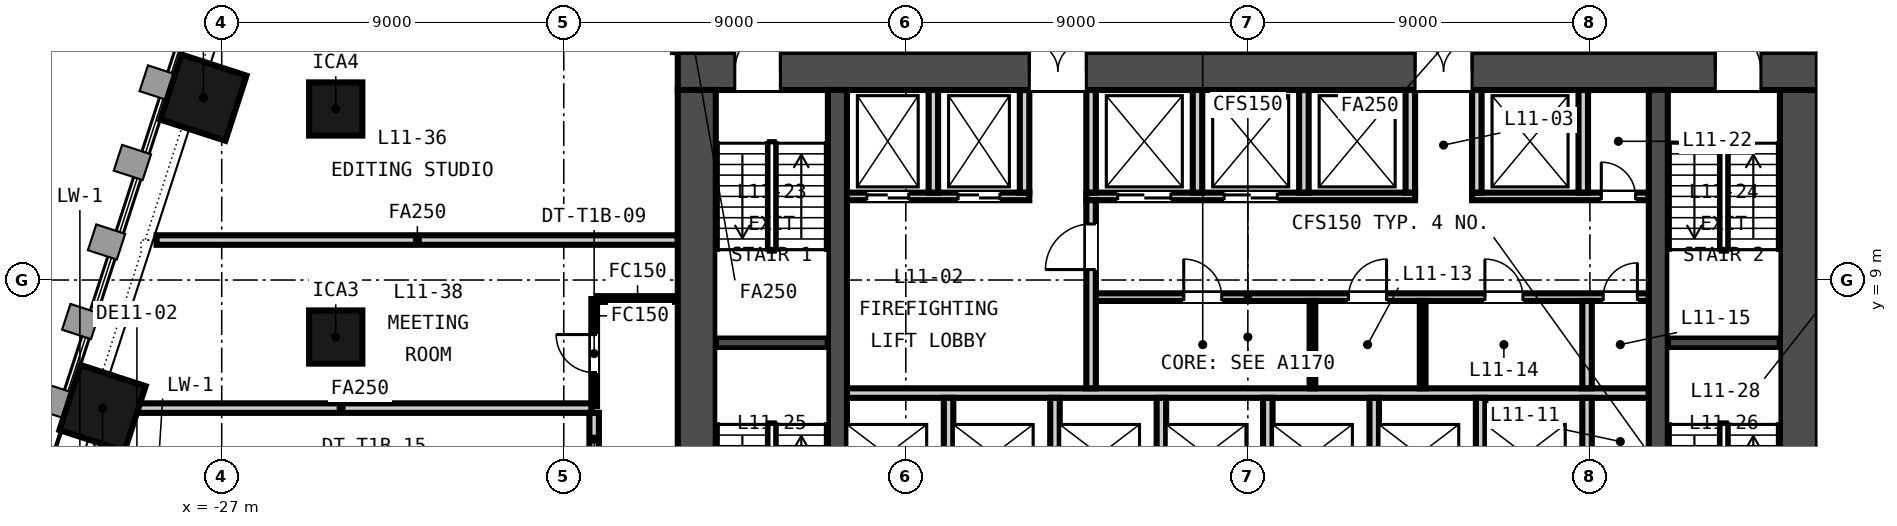
"""IFC4 building model, lengths in metres.
Left out: names, types, materials, properties, quantities, classifications, styles, units other than length and angle.
Written with IfcOpenShell. Run it as: python <this file> out.ifc"""

import sys

from ifc_helpers import new_model, si_unit, direction, frame, frame_2d, origin, origin_2d, place, context, subcontext, project, spatial, rectangle, extrude, element, fill, save


model = new_model("IFC4")
c1 = context("Model", 3, precision=1e-05, world=origin(), true_north=direction((0.0, 1.0)))
c2 = subcontext(c1, "Body", "Model", "MODEL_VIEW")
j1 = project(units=[si_unit("LENGTHUNIT", "METRE"), si_unit("PLANEANGLEUNIT", "RADIAN")], contexts=[c1])
p1 = place(None, origin())
s1 = spatial("IfcSite", under=j1, at=p1, CompositionType="ELEMENT")
p2 = place(p1, origin())
s2 = spatial("IfcBuilding", under=s1, at=p2, CompositionType="ELEMENT")
p3 = place(p2, frame((0.0, 0.0, 54.25)))
s3 = spatial("IfcBuildingStorey", under=s2, at=p3, CompositionType="ELEMENT", Elevation=54.25)
p4 = place(p3, frame((-15.0, 14.5, -0.15), z_axis=(0.0, 0.0, 1.0), x_axis=(1.0, 0.0, 0.0)))
e1 = element("IfcWall", 1, at=p4, inside=s3, PredefinedType="SOLIDWALL", context=c2, shape_type="SweptSolid", body=[
    extrude(rectangle(XDim=30.0, YDim=1.0, at=frame_2d((15.0, 0.0))), origin(), (0.0, 0.0, 1.0), 3.65),
])
p5 = place(p4, frame((9.25, 0.0, 0.15)))
e2 = element("IfcOpeningElement", 2, at=p5, cuts=e1, PredefinedType="OPENING", context=c2, shape_type="SweptSolid", body=[
    extrude(rectangle(XDim=1.5, YDim=2.1, at=frame_2d((0.75, 1.05))), frame((0.0, 0.51, 0.0), z_axis=(0.0, -1.0, 0.0), x_axis=(1.0, 0.0, 0.0)), (0.0, 0.0, 1.0), 1.02),
])
p6 = place(p4, frame((19.4, 0.0, 0.15)))
e3 = element("IfcOpeningElement", 3, at=p6, cuts=e1, PredefinedType="OPENING", context=c2, shape_type="SweptSolid", body=[
    extrude(rectangle(XDim=1.5, YDim=2.1, at=frame_2d((0.75, 1.05))), frame((0.0, 0.51, 0.0), z_axis=(0.0, -1.0, 0.0), x_axis=(1.0, 0.0, 0.0)), (0.0, 0.0, 1.0), 1.02),
])
p7 = place(p4, frame((1.5, 0.0, 0.15)))
e4 = element("IfcOpeningElement", 4, at=p7, cuts=e1, PredefinedType="OPENING", context=c2, shape_type="SweptSolid", body=[
    extrude(rectangle(XDim=1.2, YDim=2.1, at=frame_2d((0.6, 1.05))), frame((0.0, 0.51, 0.0), z_axis=(0.0, -1.0, 0.0), x_axis=(1.0, 0.0, 0.0)), (0.0, 0.0, 1.0), 1.02),
])
p8 = place(p4, frame((27.3, 0.0, 0.15)))
e5 = element("IfcOpeningElement", 5, at=p8, cuts=e1, PredefinedType="OPENING", context=c2, shape_type="SweptSolid", body=[
    extrude(rectangle(XDim=1.2, YDim=2.1, at=frame_2d((0.6, 1.05))), frame((0.0, 0.51, 0.0), z_axis=(0.0, -1.0, 0.0), x_axis=(1.0, 0.0, 0.0)), (0.0, 0.0, 1.0), 1.02),
])
for number, where, z_axis, x_axis in (
    (6, (-14.5, 1.0, -0.15), (0.0, 0.0, 1.0), (0.0, 1.0, 0.0)),
    (7, (14.5, 1.0, -0.15), (0.0, 0.0, 1.0), (0.0, 1.0, 0.0)),
):
    element("IfcWall", number, at=place(p3, frame(where, z_axis=z_axis, x_axis=x_axis)), inside=s3, PredefinedType="SOLIDWALL", context=c2, shape_type="SweptSolid", body=[
        extrude(rectangle(XDim=13.0, YDim=1.0, at=frame_2d((6.5, 0.0))), origin(), (0.0, 0.0, 1.0), 3.65),
    ])
for number, where, z_axis, x_axis in (
    (8, (-10.8, 1.0, -0.15), (0.0, 0.0, 1.0), (0.0, 1.0, 0.0)),
    (9, (10.8, 1.0, -0.15), (0.0, 0.0, 1.0), (0.0, 1.0, 0.0)),
):
    element("IfcWall", number, at=place(p3, frame(where, z_axis=z_axis, x_axis=x_axis)), inside=s3, PredefinedType="SOLIDWALL", context=c2, shape_type="SweptSolid", body=[
        extrude(rectangle(XDim=13.0, YDim=0.5, at=frame_2d((6.5, 0.0))), origin(), (0.0, 0.0, 1.0), 3.65),
    ])
for number, where, z_axis, x_axis in (
    (10, (-27.482, 13.799, -0.15), (0.0, 0.0, 1.0), (-0.309, -0.951, 0.0)),
    (11, (-30.136, 5.63, -0.15), (0.0, 0.0, 1.0), (-0.309, -0.951, 0.0)),
):
    element("IfcColumn", number, at=place(p3, frame(where, z_axis=z_axis, x_axis=x_axis)), inside=s3, PredefinedType="COLUMN", context=c2, shape_type="SweptSolid", body=[
        extrude(rectangle(XDim=1.8, YDim=1.8, at=origin_2d()), origin(), (0.0, 0.0, 1.0), 3.65),
    ])
for number, where, z_axis, x_axis in (
    (12, (-24.0, 7.5, -0.15), (0.0, 0.0, 1.0), (1.0, 0.0, 0.0)),
    (13, (-24.0, 13.5, -0.15), (0.0, 0.0, 1.0), (1.0, 0.0, 0.0)),
):
    element("IfcColumn", number, at=place(p3, frame(where, z_axis=z_axis, x_axis=x_axis)), inside=s3, PredefinedType="COLUMN", context=c2, shape_type="SweptSolid", body=[
        extrude(rectangle(XDim=1.4, YDim=1.4, at=origin_2d()), origin(), (0.0, 0.0, 1.0), 3.65),
    ])
p9 = place(p3, frame((-10.55, 6.025, 0.0), z_axis=(0.0, 0.0, 1.0), x_axis=(1.0, 0.0, 0.0)))
e14 = element("IfcWall", 14, at=p9, inside=s3, PredefinedType="PARTITIONING", context=c2, shape_type="SweptSolid", body=[
    extrude(rectangle(XDim=21.1, YDim=0.25, at=frame_2d((10.55, 0.0))), origin(), (0.0, 0.0, 1.0), 3.5),
])
p10 = place(p3, frame((-4.125, 8.55, 0.0), z_axis=(0.0, 0.0, 1.0), x_axis=(1.0, 0.0, 0.0)))
e15 = element("IfcWall", 15, at=p10, inside=s3, PredefinedType="PARTITIONING", context=c2, shape_type="SweptSolid", body=[
    extrude(rectangle(XDim=14.675, YDim=0.2, at=frame_2d((7.337, 0.0))), origin(), (0.0, 0.0, 1.0), 3.5),
])
p11 = place(p10, frame((2.438, 0.0, 0.0)))
e16 = element("IfcOpeningElement", 16, at=p11, cuts=e15, PredefinedType="OPENING", context=c2, shape_type="SweptSolid", body=[
    extrude(rectangle(XDim=1.0, YDim=2.1, at=frame_2d((0.5, 1.05))), frame((0.0, 0.11, 0.0), z_axis=(0.0, -1.0, 0.0), x_axis=(1.0, 0.0, 0.0)), (0.0, 0.0, 1.0), 0.22),
])
p12 = place(p10, frame((6.775, 0.0, 0.0)))
e17 = element("IfcOpeningElement", 17, at=p12, cuts=e15, PredefinedType="OPENING", context=c2, shape_type="SweptSolid", body=[
    extrude(rectangle(XDim=1.0, YDim=2.1, at=frame_2d((0.5, 1.05))), frame((0.0, 0.11, 0.0), z_axis=(0.0, -1.0, 0.0), x_axis=(1.0, 0.0, 0.0)), (0.0, 0.0, 1.0), 0.22),
])
p13 = place(p10, frame((10.363, 0.0, 0.0)))
e18 = element("IfcOpeningElement", 18, at=p13, cuts=e15, PredefinedType="OPENING", context=c2, shape_type="SweptSolid", body=[
    extrude(rectangle(XDim=1.0, YDim=2.1, at=frame_2d((0.5, 1.05))), frame((0.0, 0.11, 0.0), z_axis=(0.0, -1.0, 0.0), x_axis=(1.0, 0.0, 0.0)), (0.0, 0.0, 1.0), 0.22),
])
p14 = place(p10, frame((13.475, 0.0, 0.0)))
e19 = element("IfcOpeningElement", 19, at=p14, cuts=e15, PredefinedType="OPENING", context=c2, shape_type="SweptSolid", body=[
    extrude(rectangle(XDim=0.9, YDim=2.1, at=frame_2d((0.45, 1.05))), frame((0.0, 0.11, 0.0), z_axis=(0.0, -1.0, 0.0), x_axis=(1.0, 0.0, 0.0)), (0.0, 0.0, 1.0), 0.22),
])
p15 = place(p3, frame((-10.55, 11.2, 0.0), z_axis=(0.0, 0.0, 1.0), x_axis=(1.0, 0.0, 0.0)))
e20 = element("IfcWall", 20, at=p15, inside=s3, PredefinedType="PARTITIONING", context=c2, shape_type="SweptSolid", body=[
    extrude(rectangle(XDim=4.8, YDim=0.2, at=frame_2d((2.4, 0.0))), origin(), (0.0, 0.0, 1.0), 3.5),
])
p16 = place(p15, frame((0.525, 0.0, 0.0)))
e21 = element("IfcOpeningElement", 21, at=p16, cuts=e20, PredefinedType="OPENING", context=c2, shape_type="SweptSolid", body=[
    extrude(rectangle(XDim=1.1, YDim=2.1, at=frame_2d((0.55, 1.05))), frame((0.0, 0.11, 0.0), z_axis=(0.0, -1.0, 0.0), x_axis=(1.0, 0.0, 0.0)), (0.0, 0.0, 1.0), 0.22),
])
p17 = place(p15, frame((2.925, 0.0, 0.0)))
e22 = element("IfcOpeningElement", 22, at=p17, cuts=e20, PredefinedType="OPENING", context=c2, shape_type="SweptSolid", body=[
    extrude(rectangle(XDim=1.1, YDim=2.1, at=frame_2d((0.55, 1.05))), frame((0.0, 0.11, 0.0), z_axis=(0.0, -1.0, 0.0), x_axis=(1.0, 0.0, 0.0)), (0.0, 0.0, 1.0), 0.22),
])
p18 = place(p3, frame((-4.25, 11.2, 0.0), z_axis=(0.0, 0.0, 1.0), x_axis=(1.0, 0.0, 0.0)))
e23 = element("IfcWall", 23, at=p18, inside=s3, PredefinedType="PARTITIONING", context=c2, shape_type="SweptSolid", body=[
    extrude(rectangle(XDim=8.65, YDim=0.2, at=frame_2d((4.325, 0.0))), origin(), (0.0, 0.0, 1.0), 3.5),
])
p19 = place(p18, frame((0.825, 0.0, 0.0)))
e24 = element("IfcOpeningElement", 24, at=p19, cuts=e23, PredefinedType="OPENING", context=c2, shape_type="SweptSolid", body=[
    extrude(rectangle(XDim=1.4, YDim=2.1, at=frame_2d((0.7, 1.05))), frame((0.0, 0.11, 0.0), z_axis=(0.0, -1.0, 0.0), x_axis=(1.0, 0.0, 0.0)), (0.0, 0.0, 1.0), 0.22),
])
p20 = place(p18, frame((3.625, 0.0, 0.0)))
e25 = element("IfcOpeningElement", 25, at=p20, cuts=e23, PredefinedType="OPENING", context=c2, shape_type="SweptSolid", body=[
    extrude(rectangle(XDim=1.4, YDim=2.1, at=frame_2d((0.7, 1.05))), frame((0.0, 0.11, 0.0), z_axis=(0.0, -1.0, 0.0), x_axis=(1.0, 0.0, 0.0)), (0.0, 0.0, 1.0), 0.22),
])
p21 = place(p3, frame((5.9, 11.2, 0.0), z_axis=(0.0, 0.0, 1.0), x_axis=(1.0, 0.0, 0.0)))
e26 = element("IfcWall", 26, at=p21, inside=s3, PredefinedType="PARTITIONING", context=c2, shape_type="SweptSolid", body=[
    extrude(rectangle(XDim=4.65, YDim=0.2, at=frame_2d((2.325, 0.0))), origin(), (0.0, 0.0, 1.0), 3.5),
])
p22 = place(p21, frame((3.4, 0.0, 0.0)))
e27 = element("IfcOpeningElement", 27, at=p22, cuts=e26, PredefinedType="OPENING", context=c2, shape_type="SweptSolid", body=[
    extrude(rectangle(XDim=0.9, YDim=2.1, at=frame_2d((0.45, 1.05))), frame((0.0, 0.11, 0.0), z_axis=(0.0, -1.0, 0.0), x_axis=(1.0, 0.0, 0.0)), (0.0, 0.0, 1.0), 0.22),
])
p23 = place(p3, frame((-4.125, 6.15, 0.0), z_axis=(0.0, 0.0, 1.0), x_axis=(0.0, 1.0, 0.0)))
e28 = element("IfcWall", 28, at=p23, inside=s3, PredefinedType="PARTITIONING", context=c2, shape_type="SweptSolid", body=[
    extrude(rectangle(XDim=4.95, YDim=0.25, at=frame_2d((2.475, 0.0))), origin(), (0.0, 0.0, 1.0), 3.5),
])
p24 = place(p23, frame((3.125, 0.0, 0.0)))
e29 = element("IfcOpeningElement", 29, at=p24, cuts=e28, PredefinedType="OPENING", context=c2, shape_type="SweptSolid", body=[
    extrude(rectangle(XDim=1.2, YDim=2.1, at=frame_2d((0.6, 1.05))), frame((0.0, 0.135, 0.0), z_axis=(0.0, -1.0, 0.0), x_axis=(1.0, 0.0, 0.0)), (0.0, 0.0, 1.0), 0.27),
])
for number, where, z_axis, x_axis in (
    (30, (-7.875, 3.6, 0.0), (0.0, 0.0, 1.0), (0.0, 1.0, 0.0)),
    (31, (-5.075, 3.6, 0.0), (0.0, 0.0, 1.0), (0.0, 1.0, 0.0)),
    (32, (-2.275, 3.6, 0.0), (0.0, 0.0, 1.0), (0.0, 1.0, 0.0)),
    (33, (0.525, 3.6, 0.0), (0.0, 0.0, 1.0), (0.0, 1.0, 0.0)),
    (34, (3.325, 3.6, 0.0), (0.0, 0.0, 1.0), (0.0, 1.0, 0.0)),
    (35, (6.125, 3.6, 0.0), (0.0, 0.0, 1.0), (0.0, 1.0, 0.0)),
    (36, (8.925, 3.6, 0.0), (0.0, 0.0, 1.0), (0.0, 1.0, 0.0)),
):
    element("IfcWall", number, at=place(p3, frame(where, z_axis=z_axis, x_axis=x_axis)), inside=s3, PredefinedType="PARTITIONING", context=c2, shape_type="SweptSolid", body=[
        extrude(rectangle(XDim=2.3, YDim=0.25, at=frame_2d((1.15, 0.0))), origin(), (0.0, 0.0, 1.0), 3.5),
    ])
for number, where, z_axis, x_axis in (
    (37, (1.7, 6.15, 0.0), (0.0, 0.0, 1.0), (0.0, 1.0, 0.0)),
    (38, (4.6, 6.15, 0.0), (0.0, 0.0, 1.0), (0.0, 1.0, 0.0)),
):
    element("IfcWall", number, at=place(p3, frame(where, z_axis=z_axis, x_axis=x_axis)), inside=s3, PredefinedType="PARTITIONING", context=c2, shape_type="SweptSolid", body=[
        extrude(rectangle(XDim=2.3, YDim=0.15, at=frame_2d((1.15, 0.0))), origin(), (0.0, 0.0, 1.0), 3.5),
    ])
p25 = place(p3, frame((8.925, 6.15, 0.0), z_axis=(0.0, 0.0, 1.0), x_axis=(0.0, 1.0, 0.0)))
e39 = element("IfcWall", 39, at=p25, inside=s3, PredefinedType="PARTITIONING", context=c2, shape_type="SweptSolid", body=[
    extrude(rectangle(XDim=2.3, YDim=0.25, at=frame_2d((1.15, 0.0))), origin(), (0.0, 0.0, 1.0), 3.5),
])
for number, where, z_axis, x_axis in (
    (40, (-8.275, 11.3, 0.0), (0.0, 0.0, 1.0), (0.0, 1.0, 0.0)),
    (41, (-5.875, 11.3, 0.0), (0.0, 0.0, 1.0), (0.0, 1.0, 0.0)),
    (42, (-4.125, 11.3, 0.0), (0.0, 0.0, 1.0), (0.0, 1.0, 0.0)),
    (43, (-1.325, 11.3, 0.0), (0.0, 0.0, 1.0), (0.0, 1.0, 0.0)),
    (44, (1.475, 11.3, 0.0), (0.0, 0.0, 1.0), (0.0, 1.0, 0.0)),
    (45, (4.275, 11.3, 0.0), (0.0, 0.0, 1.0), (0.0, 1.0, 0.0)),
    (46, (6.025, 11.3, 0.0), (0.0, 0.0, 1.0), (0.0, 1.0, 0.0)),
    (47, (8.825, 11.3, 0.0), (0.0, 0.0, 1.0), (0.0, 1.0, 0.0)),
):
    element("IfcWall", number, at=place(p3, frame(where, z_axis=z_axis, x_axis=x_axis)), inside=s3, PredefinedType="PARTITIONING", context=c2, shape_type="SweptSolid", body=[
        extrude(rectangle(XDim=2.7, YDim=0.25, at=frame_2d((1.35, 0.0))), origin(), (0.0, 0.0, 1.0), 3.5),
    ])
for number, where, z_axis, x_axis in (
    (48, (-14.0, 7.35, -0.15), (0.0, 0.0, 1.0), (1.0, 0.0, 0.0)),
    (49, (11.05, 7.35, -0.15), (0.0, 0.0, 1.0), (1.0, 0.0, 0.0)),
):
    element("IfcWall", number, at=place(p3, frame(where, z_axis=z_axis, x_axis=x_axis)), inside=s3, PredefinedType="SOLIDWALL", context=c2, shape_type="SweptSolid", body=[
        extrude(rectangle(XDim=2.95, YDim=0.3, at=frame_2d((1.475, 0.0))), origin(), (0.0, 0.0, 1.0), 3.65),
    ])
p26 = place(p3, frame((-15.002, 14.998, 0.0), z_axis=(0.0, 0.0, 1.0), x_axis=(0.000708152429, 0.99999974926, 0.0)))
e50 = element("IfcWall", 50, at=p26, inside=s3, PredefinedType="PARTITIONING", context=c2, shape_type="SweptSolid", body=[
    extrude(rectangle(XDim=2.758, YDim=0.25, at=frame_2d((1.379, 0.0))), origin(), (0.0, 0.0, 1.0), 2.741),
])
p27 = place(p26, frame((0.479, 0.0, 0.0)))
e51 = element("IfcOpeningElement", 51, at=p27, cuts=e50, PredefinedType="OPENING", context=c2, shape_type="SweptSolid", body=[
    extrude(rectangle(XDim=1.8, YDim=2.1, at=frame_2d((0.9, 1.05))), frame((0.0, 0.135, 0.0), z_axis=(0.0, -1.0, 0.0), x_axis=(1.0, 0.0, 0.0)), (0.0, 0.0, 1.0), 0.27),
])
p28 = place(p3, frame((-28.714, 10.052, 0.0), z_axis=(0.0, 0.0, 1.0), x_axis=(1.0, 0.0, 0.0)))
e52 = element("IfcWall", 52, at=p28, inside=s3, PredefinedType="PARTITIONING", context=c2, shape_type="SweptSolid", body=[
    extrude(rectangle(XDim=13.714, YDim=0.25, at=frame_2d((6.857, 0.0))), origin(), (0.0, 0.0, 1.0), 2.741),
])
p29 = place(p3, frame((-17.2, 5.68, 0.0), z_axis=(0.0, 0.0, 1.0), x_axis=(0.0, 1.0, 0.0)))
e53 = element("IfcWall", 53, at=p29, inside=s3, PredefinedType="PARTITIONING", context=c2, shape_type="SweptSolid", body=[
    extrude(rectangle(XDim=2.82, YDim=0.15, at=frame_2d((1.41, 0.0))), origin(), (0.0, 0.0, 1.0), 2.741),
])
p30 = place(p29, frame((0.885, 0.0, 0.0)))
e54 = element("IfcOpeningElement", 54, at=p30, cuts=e53, PredefinedType="OPENING", context=c2, shape_type="SweptSolid", body=[
    extrude(rectangle(XDim=1.0, YDim=2.1, at=frame_2d((0.5, 1.05))), frame((0.0, 0.085, 0.0), z_axis=(0.0, -1.0, 0.0), x_axis=(1.0, 0.0, 0.0)), (0.0, 0.0, 1.0), 0.17),
])
p31 = place(p3, frame((-17.125, 8.5, 0.0), z_axis=(0.0, 0.0, 1.0), x_axis=(1.0, 0.0, 0.0)))
e55 = element("IfcWall", 55, at=p31, inside=s3, PredefinedType="PARTITIONING", context=c2, shape_type="SweptSolid", body=[
    extrude(rectangle(XDim=2.125, YDim=0.15, at=frame_2d((1.062, 0.0))), origin(), (0.0, 0.0, 1.0), 2.741),
])
p32 = place(p3, frame((-30.451, 5.63, 0.0), z_axis=(0.0, 0.0, 1.0), x_axis=(1.0, 0.0, 0.0)))
e56 = element("IfcWall", 56, at=p32, inside=s3, PredefinedType="PARTITIONING", context=c2, shape_type="SweptSolid", body=[
    extrude(rectangle(XDim=13.176, YDim=0.25, at=frame_2d((6.588, 0.0))), origin(), (0.0, 0.0, 1.0), 2.741),
])
p33 = place(p3, frame((-17.2, 4.125, 0.0), z_axis=(0.0, 0.0, 1.0), x_axis=(0.0, 1.0, 0.0)))
e57 = element("IfcWall", 57, at=p33, inside=s3, PredefinedType="PARTITIONING", context=c2, shape_type="SweptSolid", body=[
    extrude(rectangle(XDim=1.38, YDim=0.25, at=frame_2d((0.69, 0.0))), origin(), (0.0, 0.0, 1.0), 2.741),
])
p34 = place(p24, origin())
e58 = element("IfcDoor", 58, at=p34, inside=s3, OperationType="SINGLE_SWING_LEFT", PredefinedType="DOOR", context=c2, shape_type="SweptSolid", body=[
    extrude(rectangle(XDim=1.2, YDim=2.1, at=frame_2d((0.6, 1.05))), frame((0.0, 0.025, 0.0), z_axis=(0.0, -1.0, 0.0), x_axis=(1.0, 0.0, 0.0)), (0.0, 0.0, 1.0), 0.05),
])
fill(e29, e58)
p35 = place(p11, origin())
e59 = element("IfcDoor", 59, at=p35, inside=s3, OperationType="SINGLE_SWING_LEFT", PredefinedType="DOOR", context=c2, shape_type="SweptSolid", body=[
    extrude(rectangle(XDim=1.0, YDim=2.1, at=frame_2d((0.5, 1.05))), frame((0.0, 0.025, 0.0), z_axis=(0.0, -1.0, 0.0), x_axis=(1.0, 0.0, 0.0)), (0.0, 0.0, 1.0), 0.05),
])
fill(e16, e59)
p36 = place(p12, origin())
e60 = element("IfcDoor", 60, at=p36, inside=s3, OperationType="SINGLE_SWING_RIGHT", PredefinedType="DOOR", context=c2, shape_type="SweptSolid", body=[
    extrude(rectangle(XDim=1.0, YDim=2.1, at=frame_2d((0.5, 1.05))), frame((0.0, 0.025, 0.0), z_axis=(0.0, -1.0, 0.0), x_axis=(1.0, 0.0, 0.0)), (0.0, 0.0, 1.0), 0.05),
])
fill(e17, e60)
p37 = place(p13, origin())
e61 = element("IfcDoor", 61, at=p37, inside=s3, OperationType="SINGLE_SWING_LEFT", PredefinedType="DOOR", context=c2, shape_type="SweptSolid", body=[
    extrude(rectangle(XDim=1.0, YDim=2.1, at=frame_2d((0.5, 1.05))), frame((0.0, 0.025, 0.0), z_axis=(0.0, -1.0, 0.0), x_axis=(1.0, 0.0, 0.0)), (0.0, 0.0, 1.0), 0.05),
])
fill(e18, e61)
p38 = place(p14, origin())
e62 = element("IfcDoor", 62, at=p38, inside=s3, OperationType="SINGLE_SWING_RIGHT", PredefinedType="DOOR", context=c2, shape_type="SweptSolid", body=[
    extrude(rectangle(XDim=0.9, YDim=2.1, at=frame_2d((0.45, 1.05))), frame((0.0, 0.025, 0.0), z_axis=(0.0, -1.0, 0.0), x_axis=(1.0, 0.0, 0.0)), (0.0, 0.0, 1.0), 0.05),
])
fill(e19, e62)
p39 = place(p16, origin())
e63 = element("IfcDoor", 63, at=p39, inside=s3, OperationType="DOUBLE_DOOR_SLIDING", PredefinedType="DOOR", context=c2, shape_type="SweptSolid", body=[
    extrude(rectangle(XDim=1.1, YDim=2.1, at=frame_2d((0.55, 1.05))), frame((0.0, 0.025, 0.0), z_axis=(0.0, -1.0, 0.0), x_axis=(1.0, 0.0, 0.0)), (0.0, 0.0, 1.0), 0.05),
])
fill(e21, e63)
p40 = place(p17, origin())
e64 = element("IfcDoor", 64, at=p40, inside=s3, OperationType="DOUBLE_DOOR_SLIDING", PredefinedType="DOOR", context=c2, shape_type="SweptSolid", body=[
    extrude(rectangle(XDim=1.1, YDim=2.1, at=frame_2d((0.55, 1.05))), frame((0.0, 0.025, 0.0), z_axis=(0.0, -1.0, 0.0), x_axis=(1.0, 0.0, 0.0)), (0.0, 0.0, 1.0), 0.05),
])
fill(e22, e64)
p41 = place(p19, origin())
e65 = element("IfcDoor", 65, at=p41, inside=s3, OperationType="DOUBLE_DOOR_SLIDING", PredefinedType="DOOR", context=c2, shape_type="SweptSolid", body=[
    extrude(rectangle(XDim=1.4, YDim=2.1, at=frame_2d((0.7, 1.05))), frame((0.0, 0.025, 0.0), z_axis=(0.0, -1.0, 0.0), x_axis=(1.0, 0.0, 0.0)), (0.0, 0.0, 1.0), 0.05),
])
fill(e24, e65)
p42 = place(p20, origin())
e66 = element("IfcDoor", 66, at=p42, inside=s3, OperationType="DOUBLE_DOOR_SLIDING", PredefinedType="DOOR", context=c2, shape_type="SweptSolid", body=[
    extrude(rectangle(XDim=1.4, YDim=2.1, at=frame_2d((0.7, 1.05))), frame((0.0, 0.025, 0.0), z_axis=(0.0, -1.0, 0.0), x_axis=(1.0, 0.0, 0.0)), (0.0, 0.0, 1.0), 0.05),
])
fill(e25, e66)
p43 = place(p22, origin())
e67 = element("IfcDoor", 67, at=p43, inside=s3, OperationType="SINGLE_SWING_LEFT", PredefinedType="DOOR", context=c2, shape_type="SweptSolid", body=[
    extrude(rectangle(XDim=0.9, YDim=2.1, at=frame_2d((0.45, 1.05))), frame((0.0, 0.025, 0.0), z_axis=(0.0, -1.0, 0.0), x_axis=(1.0, 0.0, 0.0)), (0.0, 0.0, 1.0), 0.05),
])
fill(e27, e67)
p44 = place(p5, origin())
e68 = element("IfcDoor", 68, at=p44, inside=s3, OperationType="DOUBLE_DOOR_SINGLE_SWING", PredefinedType="DOOR", context=c2, shape_type="SweptSolid", body=[
    extrude(rectangle(XDim=1.5, YDim=2.1, at=frame_2d((0.75, 1.05))), frame((0.0, 0.025, 0.0), z_axis=(0.0, -1.0, 0.0), x_axis=(1.0, 0.0, 0.0)), (0.0, 0.0, 1.0), 0.05),
])
fill(e2, e68)
p45 = place(p6, origin())
e69 = element("IfcDoor", 69, at=p45, inside=s3, OperationType="DOUBLE_DOOR_SINGLE_SWING", PredefinedType="DOOR", context=c2, shape_type="SweptSolid", body=[
    extrude(rectangle(XDim=1.5, YDim=2.1, at=frame_2d((0.75, 1.05))), frame((0.0, 0.025, 0.0), z_axis=(0.0, -1.0, 0.0), x_axis=(1.0, 0.0, 0.0)), (0.0, 0.0, 1.0), 0.05),
])
fill(e3, e69)
p46 = place(p7, origin())
e70 = element("IfcDoor", 70, at=p46, inside=s3, OperationType="SINGLE_SWING_RIGHT", PredefinedType="DOOR", context=c2, shape_type="SweptSolid", body=[
    extrude(rectangle(XDim=1.2, YDim=2.1, at=frame_2d((0.6, 1.05))), frame((0.0, 0.025, 0.0), z_axis=(0.0, -1.0, 0.0), x_axis=(1.0, 0.0, 0.0)), (0.0, 0.0, 1.0), 0.05),
])
fill(e4, e70)
p47 = place(p8, origin())
e71 = element("IfcDoor", 71, at=p47, inside=s3, OperationType="SINGLE_SWING_LEFT", PredefinedType="DOOR", context=c2, shape_type="SweptSolid", body=[
    extrude(rectangle(XDim=1.2, YDim=2.1, at=frame_2d((0.6, 1.05))), frame((0.0, 0.025, 0.0), z_axis=(0.0, -1.0, 0.0), x_axis=(1.0, 0.0, 0.0)), (0.0, 0.0, 1.0), 0.05),
])
fill(e5, e71)
p48 = place(p30, origin())
e72 = element("IfcDoor", 72, at=p48, inside=s3, OperationType="SINGLE_SWING_RIGHT", PredefinedType="DOOR", context=c2, shape_type="SweptSolid", body=[
    extrude(rectangle(XDim=1.0, YDim=2.1, at=frame_2d((0.5, 1.05))), frame((0.0, 0.025, 0.0), z_axis=(0.0, -1.0, 0.0), x_axis=(1.0, 0.0, 0.0)), (0.0, 0.0, 1.0), 0.05),
])
fill(e54, e72)
save(model, sys.argv[1])
